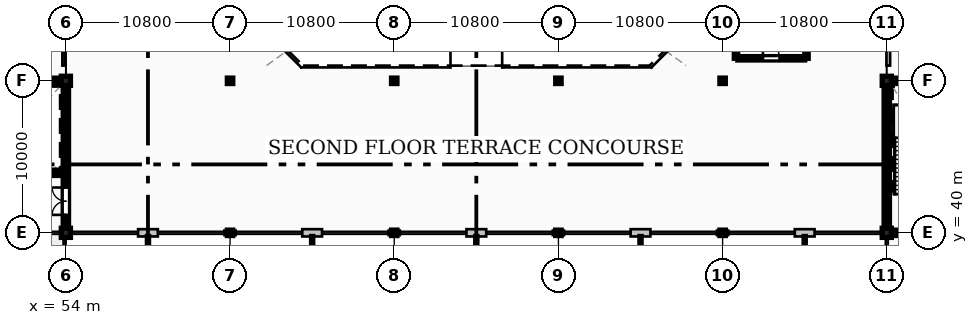
"""IFC4 building model, lengths in metres.
Left out: names, types, materials, properties, quantities, classifications, styles, units other than length and angle.
Written with IfcOpenShell. Run it as: python <this file> out.ifc"""

import sys

from ifc_helpers import new_model, si_unit, direction, frame, frame_2d, origin, origin_2d, place, context, subcontext, project, spatial, rectangle, hollow_circle, extrude, element, fill, save


model = new_model("IFC4")
c1 = context("Model", 3, precision=1e-05, world=origin(), true_north=direction((0.0, 1.0)))
c2 = subcontext(c1, "Body", "Model", "MODEL_VIEW")
j1 = project(units=[si_unit("LENGTHUNIT", "METRE"), si_unit("PLANEANGLEUNIT", "RADIAN")], contexts=[c1])
p1 = place(None, origin())
s1 = spatial("IfcSite", under=j1, at=p1, CompositionType="ELEMENT")
p2 = place(p1, origin())
s2 = spatial("IfcBuilding", under=s1, at=p2, CompositionType="ELEMENT")
p3 = place(p2, frame((0.0, 0.0, 9.6)))
s3 = spatial("IfcBuildingStorey", under=s2, at=p3, CompositionType="ELEMENT", Elevation=9.6)
for number, where, z_axis, x_axis in (
    (1, (54.0, 40.0, 0.0), (0.0, 0.0, 1.0), (1.0, 0.0, 0.0)),
    (2, (54.0, 50.0, 0.0), (0.0, 0.0, 1.0), (1.0, 0.0, 0.0)),
):
    element("IfcColumn", number, at=place(p3, frame(where, z_axis=z_axis, x_axis=x_axis)), inside=s3, PredefinedType="COLUMN", context=c2, shape_type="SweptSolid", body=[
        extrude(rectangle(XDim=0.6, YDim=0.6, at=origin_2d()), origin(), (0.0, 0.0, 1.0), 4.8),
    ])
for number, where, z_axis, x_axis in (
    (3, (64.8, 40.0, 0.0), (0.0, 0.0, 1.0), (1.0, 0.0, 0.0)),
    (4, (64.8, 50.0, 0.0), (0.0, 0.0, 1.0), (1.0, 0.0, 0.0)),
    (5, (75.6, 40.0, 0.0), (0.0, 0.0, 1.0), (1.0, 0.0, 0.0)),
    (6, (75.6, 50.0, 0.0), (0.0, 0.0, 1.0), (1.0, 0.0, 0.0)),
    (7, (86.4, 40.0, 0.0), (0.0, 0.0, 1.0), (1.0, 0.0, 0.0)),
    (8, (86.4, 50.0, 0.0), (0.0, 0.0, 1.0), (1.0, 0.0, 0.0)),
    (9, (97.2, 40.0, 0.0), (0.0, 0.0, 1.0), (1.0, 0.0, 0.0)),
    (10, (97.2, 50.0, 0.0), (0.0, 0.0, 1.0), (1.0, 0.0, 0.0)),
):
    element("IfcColumn", number, at=place(p3, frame(where, z_axis=z_axis, x_axis=x_axis)), inside=s3, PredefinedType="COLUMN", context=c2, shape_type="SweptSolid", body=[
        extrude(hollow_circle(Radius=0.178, WallThickness=0.016, at=origin_2d()), origin(), (0.0, 0.0, 1.0), 4.8),
    ])
for number, where, z_axis, x_axis in (
    (11, (108.0, 40.0, 0.0), (0.0, 0.0, 1.0), (1.0, 0.0, 0.0)),
    (12, (108.0, 50.0, 0.0), (0.0, 0.0, 1.0), (1.0, 0.0, 0.0)),
):
    element("IfcColumn", number, at=place(p3, frame(where, z_axis=z_axis, x_axis=x_axis)), inside=s3, PredefinedType="COLUMN", context=c2, shape_type="SweptSolid", body=[
        extrude(rectangle(XDim=0.6, YDim=0.6, at=origin_2d()), origin(), (0.0, 0.0, 1.0), 4.8),
    ])
for number, where, z_axis, x_axis in (
    (13, (108.0, 39.855, 0.0), (0.0, 0.0, 1.0), (0.0, -1.0, 0.0)),
    (14, (53.63, 40.0, 0.0), (0.0, 0.0, 1.0), (1.0, 0.0, 0.0)),
):
    element("IfcWall", number, at=place(p3, frame(where, z_axis=z_axis, x_axis=x_axis)), inside=s3, PredefinedType="STANDARD", context=c2, shape_type="SweptSolid", body=[
        extrude(rectangle(XDim=0.225, YDim=0.3, at=frame_2d((0.113, 0.0))), origin(), (0.0, 0.0, 1.0), 4.56),
    ])
p4 = place(p3, frame((58.75, 40.0, 0.0), z_axis=(0.0, 0.0, 1.0), x_axis=(1.0, 0.0, 0.0)))
e15 = element("IfcWall", 15, at=p4, inside=s3, PredefinedType="STANDARD", context=c2, shape_type="SweptSolid", body=[
    extrude(rectangle(XDim=1.3, YDim=0.48, at=frame_2d((0.65, 0.0))), origin(), (0.0, 0.0, 1.0), 4.11),
])
for number, where, z_axis, x_axis in (
    (16, (54.145, 40.0, 0.0), (0.0, 0.0, 1.0), (1.0, 0.0, 0.0)),
    (17, (64.43, 40.0, 0.0), (0.0, 0.0, 1.0), (1.0, 0.0, 0.0)),
):
    element("IfcWall", number, at=place(p3, frame(where, z_axis=z_axis, x_axis=x_axis)), inside=s3, PredefinedType="STANDARD", context=c2, shape_type="SweptSolid", body=[
        extrude(rectangle(XDim=0.225, YDim=0.3, at=frame_2d((0.113, 0.0))), origin(), (0.0, 0.0, 1.0), 4.56),
    ])
p5 = place(p3, frame((69.55, 40.0, 0.0), z_axis=(0.0, 0.0, 1.0), x_axis=(1.0, 0.0, 0.0)))
e18 = element("IfcWall", 18, at=p5, inside=s3, PredefinedType="STANDARD", context=c2, shape_type="SweptSolid", body=[
    extrude(rectangle(XDim=1.3, YDim=0.48, at=frame_2d((0.65, 0.0))), origin(), (0.0, 0.0, 1.0), 4.11),
])
p6 = place(p3, frame((64.945, 40.0, 0.0), z_axis=(0.0, 0.0, 1.0), x_axis=(1.0, 0.0, 0.0)))
e19 = element("IfcWall", 19, at=p6, inside=s3, PredefinedType="STANDARD", context=c2, shape_type="SweptSolid", body=[
    extrude(rectangle(XDim=0.225, YDim=0.3, at=frame_2d((0.112, 0.0))), origin(), (0.0, 0.0, 1.0), 4.56),
])
p7 = place(p3, frame((75.23, 40.0, 0.0), z_axis=(0.0, 0.0, 1.0), x_axis=(1.0, 0.0, 0.0)))
e20 = element("IfcWall", 20, at=p7, inside=s3, PredefinedType="STANDARD", context=c2, shape_type="SweptSolid", body=[
    extrude(rectangle(XDim=0.225, YDim=0.3, at=frame_2d((0.113, 0.0))), origin(), (0.0, 0.0, 1.0), 4.56),
])
p8 = place(p3, frame((80.35, 40.0, 0.0), z_axis=(0.0, 0.0, 1.0), x_axis=(1.0, 0.0, 0.0)))
e21 = element("IfcWall", 21, at=p8, inside=s3, PredefinedType="STANDARD", context=c2, shape_type="SweptSolid", body=[
    extrude(rectangle(XDim=1.3, YDim=0.48, at=frame_2d((0.65, 0.0))), origin(), (0.0, 0.0, 1.0), 4.11),
])
for number, where, z_axis, x_axis in (
    (22, (75.745, 40.0, 0.0), (0.0, 0.0, 1.0), (1.0, 0.0, 0.0)),
    (23, (86.03, 40.0, 0.0), (0.0, 0.0, 1.0), (1.0, 0.0, 0.0)),
):
    element("IfcWall", number, at=place(p3, frame(where, z_axis=z_axis, x_axis=x_axis)), inside=s3, PredefinedType="STANDARD", context=c2, shape_type="SweptSolid", body=[
        extrude(rectangle(XDim=0.225, YDim=0.3, at=frame_2d((0.112, 0.0))), origin(), (0.0, 0.0, 1.0), 4.56),
    ])
p9 = place(p3, frame((91.15, 40.0, 0.0), z_axis=(0.0, 0.0, 1.0), x_axis=(1.0, 0.0, 0.0)))
e24 = element("IfcWall", 24, at=p9, inside=s3, PredefinedType="STANDARD", context=c2, shape_type="SweptSolid", body=[
    extrude(rectangle(XDim=1.3, YDim=0.48, at=frame_2d((0.65, 0.0))), origin(), (0.0, 0.0, 1.0), 4.11),
])
p10 = place(p3, frame((86.545, 40.0, 0.0), z_axis=(0.0, 0.0, 1.0), x_axis=(1.0, 0.0, 0.0)))
e25 = element("IfcWall", 25, at=p10, inside=s3, PredefinedType="STANDARD", context=c2, shape_type="SweptSolid", body=[
    extrude(rectangle(XDim=0.225, YDim=0.3, at=frame_2d((0.113, 0.0))), origin(), (0.0, 0.0, 1.0), 4.56),
])
p11 = place(p3, frame((96.83, 40.0, 0.0), z_axis=(0.0, 0.0, 1.0), x_axis=(1.0, 0.0, 0.0)))
e26 = element("IfcWall", 26, at=p11, inside=s3, PredefinedType="STANDARD", context=c2, shape_type="SweptSolid", body=[
    extrude(rectangle(XDim=0.225, YDim=0.3, at=frame_2d((0.112, 0.0))), origin(), (0.0, 0.0, 1.0), 4.56),
])
p12 = place(p3, frame((101.95, 40.0, 0.0), z_axis=(0.0, 0.0, 1.0), x_axis=(1.0, 0.0, 0.0)))
e27 = element("IfcWall", 27, at=p12, inside=s3, PredefinedType="STANDARD", context=c2, shape_type="SweptSolid", body=[
    extrude(rectangle(XDim=1.3, YDim=0.48, at=frame_2d((0.65, 0.0))), origin(), (0.0, 0.0, 1.0), 4.11),
])
for number, where, z_axis, x_axis in (
    (28, (97.345, 40.0, 0.0), (0.0, 0.0, 1.0), (1.0, 0.0, 0.0)),
    (29, (107.63, 40.0, 0.0), (0.0, 0.0, 1.0), (1.0, 0.0, 0.0)),
):
    element("IfcWall", number, at=place(p3, frame(where, z_axis=z_axis, x_axis=x_axis)), inside=s3, PredefinedType="STANDARD", context=c2, shape_type="SweptSolid", body=[
        extrude(rectangle(XDim=0.225, YDim=0.3, at=frame_2d((0.113, 0.0))), origin(), (0.0, 0.0, 1.0), 4.56),
    ])
for number, where, z_axis, x_axis in (
    (30, (108.3, 40.0, 0.0), (0.0, 0.0, 1.0), (1.0, 0.0, 0.0)),
    (31, (108.3, 50.0, 0.0), (0.0, 0.0, 1.0), (1.0, 0.0, 0.0)),
):
    element("IfcWall", number, at=place(p3, frame(where, z_axis=z_axis, x_axis=x_axis)), inside=s3, PredefinedType="SHEAR", context=c2, shape_type="SweptSolid", body=[
        extrude(rectangle(XDim=10.2, YDim=0.35, at=frame_2d((5.1, 0.0))), origin(), (0.0, 0.0, 1.0), 4.56),
    ])
p13 = place(p3, frame((108.0, 40.3, 0.0), z_axis=(0.0, 0.0, 1.0), x_axis=(0.0, 1.0, 0.0)))
e32 = element("IfcWall", 32, at=p13, inside=s3, PredefinedType="SHEAR", context=c2, shape_type="SweptSolid", body=[
    extrude(rectangle(XDim=9.4, YDim=0.35, at=frame_2d((4.7, 0.0))), origin(), (0.0, 0.0, 1.0), 4.56),
])
p14 = place(p3, frame((43.5, 50.0, 0.0), z_axis=(0.0, 0.0, 1.0), x_axis=(1.0, 0.0, 0.0)))
e33 = element("IfcWall", 33, at=p14, inside=s3, PredefinedType="SHEAR", context=c2, shape_type="SweptSolid", body=[
    extrude(rectangle(XDim=10.2, YDim=0.35, at=frame_2d((5.1, 0.0))), origin(), (0.0, 0.0, 1.0), 4.56),
])
p15 = place(p3, frame((54.0, 40.3, 0.0), z_axis=(0.0, 0.0, 1.0), x_axis=(0.0, 1.0, 0.0)))
e34 = element("IfcWall", 34, at=p15, inside=s3, PredefinedType="SHEAR", context=c2, shape_type="SweptSolid", body=[
    extrude(rectangle(XDim=9.4, YDim=0.35, at=frame_2d((4.7, 0.0))), origin(), (0.0, 0.0, 1.0), 4.56),
])
p16 = place(p15, frame((0.88, 0.0, 0.0)))
e35 = element("IfcOpeningElement", 35, at=p16, cuts=e34, PredefinedType="OPENING", context=c2, shape_type="SweptSolid", body=[
    extrude(rectangle(XDim=1.8, YDim=2.25, at=frame_2d((0.9, 1.125))), frame((0.0, 0.185, 0.0), z_axis=(0.0, -1.0, 0.0), x_axis=(1.0, 0.0, 0.0)), (0.0, 0.0, 1.0), 0.37),
])
p17 = place(p3, frame((48.33, 43.95, 0.0), z_axis=(0.0, 0.0, 1.0), x_axis=(1.0, 0.0, 0.0)))
e36 = element("IfcWall", 36, at=p17, inside=s3, PredefinedType="SHEAR", context=c2, shape_type="SweptSolid", body=[
    extrude(rectangle(XDim=5.49, YDim=0.35, at=frame_2d((2.745, 0.0))), origin(), (0.0, 0.0, 1.0), 4.56),
])
p18 = place(p17, frame((2.1, 0.0, 0.0)))
e37 = element("IfcOpeningElement", 37, at=p18, cuts=e36, PredefinedType="OPENING", context=c2, shape_type="SweptSolid", body=[
    extrude(rectangle(XDim=1.1, YDim=2.2, at=frame_2d((0.55, 1.1))), frame((0.0, 0.185, 0.0), z_axis=(0.0, -1.0, 0.0), x_axis=(1.0, 0.0, 0.0)), (0.0, 0.0, 1.0), 0.37),
])
for number, where, z_axis, x_axis in (
    (38, (98.08, 51.48, 0.0), (0.0, 0.0, 1.0), (0.0, 1.0, 0.0)),
    (39, (102.72, 51.48, 0.0), (0.0, 0.0, 1.0), (0.0, 1.0, 0.0)),
):
    element("IfcWall", number, at=place(p3, frame(where, z_axis=z_axis, x_axis=x_axis)), inside=s3, PredefinedType="SHEAR", context=c2, shape_type="SweptSolid", body=[
        extrude(rectangle(XDim=9.79, YDim=0.22, at=frame_2d((4.895, 0.0))), origin(), (0.0, 0.0, 1.0), 4.56),
    ])
p19 = place(p3, frame((98.2, 51.48, 0.0), z_axis=(0.0, 0.0, 1.0), x_axis=(1.0, 0.0, 0.0)))
e40 = element("IfcWall", 40, at=p19, inside=s3, PredefinedType="SHEAR", context=c2, shape_type="SweptSolid", body=[
    extrude(rectangle(XDim=4.4, YDim=0.22, at=frame_2d((2.2, 0.0))), origin(), (0.0, 0.0, 1.0), 4.56),
])
p20 = place(p19, frame((1.65, 0.0, 0.0)))
e41 = element("IfcOpeningElement", 41, at=p20, cuts=e40, PredefinedType="OPENING", context=c2, shape_type="SweptSolid", body=[
    extrude(rectangle(XDim=1.1, YDim=2.2, at=frame_2d((0.55, 1.1))), frame((0.0, 0.12, 0.0), z_axis=(0.0, -1.0, 0.0), x_axis=(1.0, 0.0, 0.0)), (0.0, 0.0, 1.0), 0.24),
])
p21 = place(p3, frame((53.86, 51.0, 0.0), z_axis=(0.0, 0.0, 1.0), x_axis=(0.0, 1.0, 0.0)))
e42 = element("IfcWall", 42, at=p21, inside=s3, PredefinedType="PLUMBINGWALL", context=c2, shape_type="SweptSolid", body=[
    extrude(rectangle(XDim=4.2, YDim=0.18, at=frame_2d((2.1, 0.0))), origin(), (0.0, 0.0, 1.0), 4.52),
])
p22 = place(p3, frame((108.1, 51.0, 0.0), z_axis=(0.0, 0.0, 1.0), x_axis=(0.0, 1.0, 0.0)))
e43 = element("IfcWall", 43, at=p22, inside=s3, PredefinedType="SOLIDWALL", context=c2, shape_type="SweptSolid", body=[
    extrude(rectangle(XDim=10.82, YDim=0.24, at=frame_2d((5.41, 0.0))), origin(), (0.0, 0.0, 1.0), 3.92),
])
p23 = place(p16, origin())
e44 = element("IfcDoor", 44, at=p23, inside=s3, OperationType="DOUBLE_DOOR_SINGLE_SWING", PredefinedType="DOOR", context=c2, shape_type="SweptSolid", body=[
    extrude(rectangle(XDim=1.8, YDim=2.25, at=frame_2d((0.9, 1.125))), frame((0.0, 0.025, 0.0), z_axis=(0.0, -1.0, 0.0), x_axis=(1.0, 0.0, 0.0)), (0.0, 0.0, 1.0), 0.05),
])
fill(e35, e44)
p24 = place(p20, origin())
e45 = element("IfcDoor", 45, at=p24, inside=s3, OperationType="SINGLE_SWING_LEFT", PredefinedType="DOOR", context=c2, shape_type="SweptSolid", body=[
    extrude(rectangle(XDim=1.1, YDim=2.2, at=frame_2d((0.55, 1.1))), frame((0.0, 0.025, 0.0), z_axis=(0.0, -1.0, 0.0), x_axis=(1.0, 0.0, 0.0)), (0.0, 0.0, 1.0), 0.05),
])
fill(e41, e45)
save(model, sys.argv[1])
